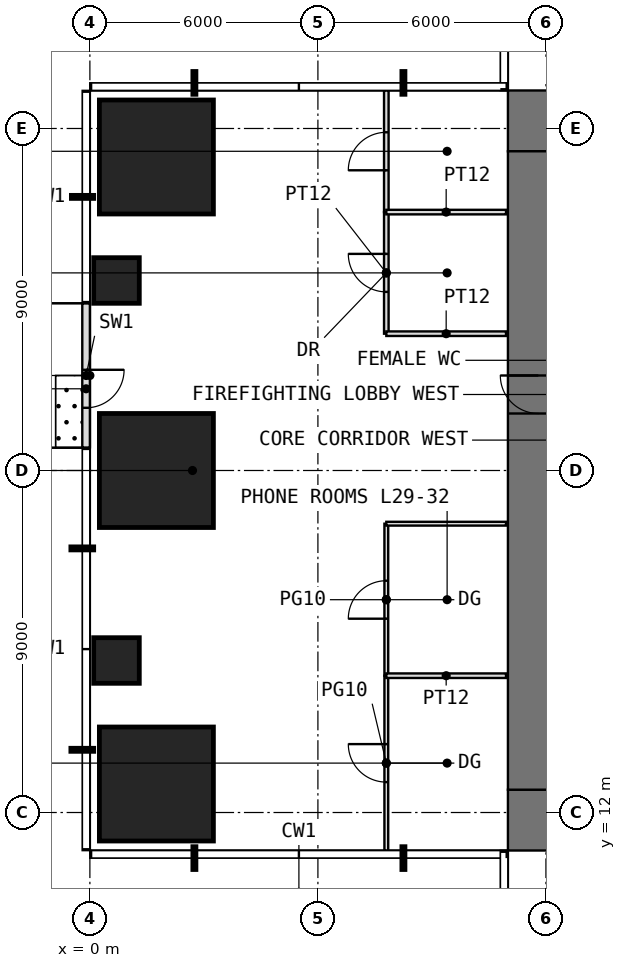
"""IFC4 building model, lengths in metres.
Left out: names, types, materials, properties, quantities, classifications, styles, units other than length and angle.
Written with IfcOpenShell. Run it as: python <this file> out.ifc"""

import sys

from ifc_helpers import new_model, si_unit, direction, frame, frame_2d, origin, origin_2d, place, context, subcontext, project, spatial, rectangle, extrude, element, fill, save


model = new_model("IFC4")
c1 = context("Model", 3, precision=1e-05, world=origin(), true_north=direction((0.0, 1.0)))
c2 = subcontext(c1, "Body", "Model", "MODEL_VIEW")
j1 = project(units=[si_unit("LENGTHUNIT", "METRE"), si_unit("PLANEANGLEUNIT", "RADIAN")], contexts=[c1])
p1 = place(None, origin())
s1 = spatial("IfcSite", under=j1, at=p1, CompositionType="ELEMENT")
p2 = place(p1, origin())
s2 = spatial("IfcBuilding", under=s1, at=p2, CompositionType="ELEMENT")
p3 = place(p2, frame((0.0, 0.0, 124.5)))
s3 = spatial("IfcBuildingStorey", under=s2, at=p3, CompositionType="ELEMENT", Elevation=124.5)
p4 = place(p3, frame((1.75, 12.75, 0.0), z_axis=(0.0, 0.0, 1.0), x_axis=(1.0, 0.0, 0.0)))
e1 = element("IfcColumn", 1, at=p4, inside=s3, PredefinedType="COLUMN", context=c2, shape_type="SweptSolid", body=[
    extrude(rectangle(XDim=3.0, YDim=3.0, at=origin_2d()), origin(), (0.0, 0.0, 1.0), 4.0),
])
p5 = place(p3, frame((0.7, 16.0, 0.0), z_axis=(0.0, 0.0, 1.0), x_axis=(1.0, 0.0, 0.0)))
e2 = element("IfcColumn", 2, at=p5, inside=s3, PredefinedType="COLUMN", context=c2, shape_type="SweptSolid", body=[
    extrude(rectangle(XDim=1.2, YDim=1.2, at=origin_2d()), origin(), (0.0, 0.0, 1.0), 4.0),
])
p6 = place(p3, frame((1.75, 21.0, 0.0), z_axis=(0.0, 0.0, 1.0), x_axis=(1.0, 0.0, 0.0)))
e3 = element("IfcColumn", 3, at=p6, inside=s3, PredefinedType="COLUMN", context=c2, shape_type="SweptSolid", body=[
    extrude(rectangle(XDim=3.0, YDim=3.0, at=origin_2d()), origin(), (0.0, 0.0, 1.0), 4.0),
])
p7 = place(p3, frame((0.7, 26.0, 0.0), z_axis=(0.0, 0.0, 1.0), x_axis=(1.0, 0.0, 0.0)))
e4 = element("IfcColumn", 4, at=p7, inside=s3, PredefinedType="COLUMN", context=c2, shape_type="SweptSolid", body=[
    extrude(rectangle(XDim=1.2, YDim=1.2, at=origin_2d()), origin(), (0.0, 0.0, 1.0), 4.0),
])
p8 = place(p3, frame((1.75, 29.25, 0.0), z_axis=(0.0, 0.0, 1.0), x_axis=(1.0, 0.0, 0.0)))
e5 = element("IfcColumn", 5, at=p8, inside=s3, PredefinedType="COLUMN", context=c2, shape_type="SweptSolid", body=[
    extrude(rectangle(XDim=3.0, YDim=3.0, at=origin_2d()), origin(), (0.0, 0.0, 1.0), 4.0),
])
p9 = place(p3, frame((-0.1, 25.4, 0.0), z_axis=(0.0, 0.0, 1.0), x_axis=(0.0, -1.0, 0.0)))
e6 = element("IfcWall", 6, at=p9, inside=s3, PredefinedType="USERDEFINED", context=c2, shape_type="SweptSolid", body=[
    extrude(rectangle(XDim=3.8, YDim=0.2, at=frame_2d((1.9, 0.0))), origin(), (0.0, 0.0, 1.0), 3.75),
])
p10 = place(p9, frame((1.75, 0.0, 0.0)))
e7 = element("IfcOpeningElement", 7, at=p10, cuts=e6, PredefinedType="OPENING", context=c2, shape_type="SweptSolid", body=[
    extrude(rectangle(XDim=1.0, YDim=2.4, at=frame_2d((0.5, 1.2))), frame((0.0, 0.11, 0.0), z_axis=(0.0, -1.0, 0.0), x_axis=(1.0, 0.0, 0.0)), (0.0, 0.0, 1.0), 0.22),
])
p11 = place(p3, frame((11.0, 11.8, -0.05), z_axis=(0.0, 0.0, 1.0), x_axis=(1.0, 0.0, 0.0)))
e8 = element("IfcWall", 8, at=p11, inside=s3, PredefinedType="SHEAR", context=c2, shape_type="SweptSolid", body=[
    extrude(rectangle(XDim=20.0, YDim=1.6, at=frame_2d((10.0, 0.0))), origin(), (0.0, 0.0, 1.0), 4.0),
])
p12 = place(p11, frame((9.0, 0.0, 0.05)))
e9 = element("IfcOpeningElement", 9, at=p12, cuts=e8, PredefinedType="OPENING", context=c2, shape_type="SweptSolid", body=[
    extrude(rectangle(XDim=2.0, YDim=2.2, at=frame_2d((1.0, 1.1))), frame((0.0, 0.81, 0.0), z_axis=(0.0, -1.0, 0.0), x_axis=(1.0, 0.0, 0.0)), (0.0, 0.0, 1.0), 1.62),
])
p13 = place(p3, frame((11.0, 30.2, -0.05), z_axis=(0.0, 0.0, 1.0), x_axis=(1.0, 0.0, 0.0)))
e10 = element("IfcWall", 10, at=p13, inside=s3, PredefinedType="SHEAR", context=c2, shape_type="SweptSolid", body=[
    extrude(rectangle(XDim=20.0, YDim=1.6, at=frame_2d((10.0, 0.0))), origin(), (0.0, 0.0, 1.0), 4.0),
])
p14 = place(p13, frame((9.0, 0.0, 0.05)))
e11 = element("IfcOpeningElement", 11, at=p14, cuts=e10, PredefinedType="OPENING", context=c2, shape_type="SweptSolid", body=[
    extrude(rectangle(XDim=2.0, YDim=2.2, at=frame_2d((1.0, 1.1))), frame((0.0, 0.81, 0.0), z_axis=(0.0, -1.0, 0.0), x_axis=(1.0, 0.0, 0.0)), (0.0, 0.0, 1.0), 1.62),
])
p15 = place(p3, frame((11.8, 12.6, -0.05), z_axis=(0.0, 0.0, 1.0), x_axis=(0.0, 1.0, 0.0)))
e12 = element("IfcWall", 12, at=p15, inside=s3, PredefinedType="SHEAR", context=c2, shape_type="SweptSolid", body=[
    extrude(rectangle(XDim=16.8, YDim=1.6, at=frame_2d((8.4, 0.0))), origin(), (0.0, 0.0, 1.0), 4.0),
])
p16 = place(p15, frame((9.9, 0.0, 0.05)))
e13 = element("IfcOpeningElement", 13, at=p16, cuts=e12, PredefinedType="OPENING", context=c2, shape_type="SweptSolid", body=[
    extrude(rectangle(XDim=1.0, YDim=2.2, at=frame_2d((0.5, 1.1))), frame((0.0, 0.81, 0.0), z_axis=(0.0, -1.0, 0.0), x_axis=(1.0, 0.0, 0.0)), (0.0, 0.0, 1.0), 1.62),
])
p17 = place(p3, frame((7.8, 11.0, 0.0), z_axis=(0.0, 0.0, 1.0), x_axis=(0.0, 1.0, 0.0)))
e14 = element("IfcWall", 14, at=p17, inside=s3, PredefinedType="PARTITIONING", context=c2, shape_type="SweptSolid", body=[
    extrude(rectangle(XDim=4.6, YDim=0.1, at=frame_2d((2.3, 0.0))), origin(), (0.0, 0.0, 1.0), 3.75),
])
p18 = place(p17, frame((1.8, 0.0, 0.0)))
e15 = element("IfcOpeningElement", 15, at=p18, cuts=e14, PredefinedType="OPENING", context=c2, shape_type="SweptSolid", body=[
    extrude(rectangle(XDim=1.0, YDim=2.4, at=frame_2d((0.5, 1.2))), frame((0.0, 0.06, 0.0), z_axis=(0.0, -1.0, 0.0), x_axis=(1.0, 0.0, 0.0)), (0.0, 0.0, 1.0), 0.12),
])
p19 = place(p3, frame((7.8, 15.6, 0.0), z_axis=(0.0, 0.0, 1.0), x_axis=(0.0, 1.0, 0.0)))
e16 = element("IfcWall", 16, at=p19, inside=s3, PredefinedType="PARTITIONING", context=c2, shape_type="SweptSolid", body=[
    extrude(rectangle(XDim=4.0, YDim=0.1, at=frame_2d((2.0, 0.0))), origin(), (0.0, 0.0, 1.0), 3.75),
])
p20 = place(p19, frame((1.5, 0.0, 0.0)))
e17 = element("IfcOpeningElement", 17, at=p20, cuts=e16, PredefinedType="OPENING", context=c2, shape_type="SweptSolid", body=[
    extrude(rectangle(XDim=1.0, YDim=2.4, at=frame_2d((0.5, 1.2))), frame((0.0, 0.06, 0.0), z_axis=(0.0, -1.0, 0.0), x_axis=(1.0, 0.0, 0.0)), (0.0, 0.0, 1.0), 0.12),
])
p21 = place(p3, frame((7.8, 15.6, 0.0), z_axis=(0.0, 0.0, 1.0), x_axis=(1.0, 0.0, 0.0)))
e18 = element("IfcWall", 18, at=p21, inside=s3, PredefinedType="PARTITIONING", context=c2, shape_type="SweptSolid", body=[
    extrude(rectangle(XDim=3.15, YDim=0.12, at=frame_2d((1.575, 0.0))), origin(), (0.0, 0.0, 1.0), 3.75),
])
p22 = place(p3, frame((7.8, 19.6, 0.0), z_axis=(0.0, 0.0, 1.0), x_axis=(1.0, 0.0, 0.0)))
e19 = element("IfcWall", 19, at=p22, inside=s3, PredefinedType="PARTITIONING", context=c2, shape_type="SweptSolid", body=[
    extrude(rectangle(XDim=3.15, YDim=0.1, at=frame_2d((1.575, 0.0))), origin(), (0.0, 0.0, 1.0), 3.75),
])
p23 = place(p3, frame((7.8, 24.6, 0.0), z_axis=(0.0, 0.0, 1.0), x_axis=(0.0, 1.0, 0.0)))
e20 = element("IfcWall", 20, at=p23, inside=s3, PredefinedType="PARTITIONING", context=c2, shape_type="SweptSolid", body=[
    extrude(rectangle(XDim=3.2, YDim=0.12, at=frame_2d((1.6, 0.0))), origin(), (0.0, 0.0, 1.0), 3.75),
])
p24 = place(p23, frame((1.1, 0.0, 0.0)))
e21 = element("IfcOpeningElement", 21, at=p24, cuts=e20, PredefinedType="OPENING", context=c2, shape_type="SweptSolid", body=[
    extrude(rectangle(XDim=1.0, YDim=2.2, at=frame_2d((0.5, 1.1))), frame((0.0, 0.07, 0.0), z_axis=(0.0, -1.0, 0.0), x_axis=(1.0, 0.0, 0.0)), (0.0, 0.0, 1.0), 0.14),
])
p25 = place(p3, frame((7.8, 24.6, 0.0), z_axis=(0.0, 0.0, 1.0), x_axis=(1.0, 0.0, 0.0)))
e22 = element("IfcWall", 22, at=p25, inside=s3, PredefinedType="PARTITIONING", context=c2, shape_type="SweptSolid", body=[
    extrude(rectangle(XDim=3.15, YDim=0.12, at=frame_2d((1.575, 0.0))), origin(), (0.0, 0.0, 1.0), 3.75),
])
p26 = place(p3, frame((7.8, 27.8, 0.0), z_axis=(0.0, 0.0, 1.0), x_axis=(0.0, 1.0, 0.0)))
e23 = element("IfcWall", 23, at=p26, inside=s3, PredefinedType="PARTITIONING", context=c2, shape_type="SweptSolid", body=[
    extrude(rectangle(XDim=3.2, YDim=0.12, at=frame_2d((1.6, 0.0))), origin(), (0.0, 0.0, 1.0), 3.75),
])
p27 = place(p26, frame((1.1, 0.0, 0.0)))
e24 = element("IfcOpeningElement", 24, at=p27, cuts=e23, PredefinedType="OPENING", context=c2, shape_type="SweptSolid", body=[
    extrude(rectangle(XDim=1.0, YDim=2.2, at=frame_2d((0.5, 1.1))), frame((0.0, 0.07, 0.0), z_axis=(0.0, -1.0, 0.0), x_axis=(1.0, 0.0, 0.0)), (0.0, 0.0, 1.0), 0.14),
])
p28 = place(p3, frame((7.8, 27.8, 0.0), z_axis=(0.0, 0.0, 1.0), x_axis=(1.0, 0.0, 0.0)))
e25 = element("IfcWall", 25, at=p28, inside=s3, PredefinedType="PARTITIONING", context=c2, shape_type="SweptSolid", body=[
    extrude(rectangle(XDim=3.15, YDim=0.12, at=frame_2d((1.575, 0.0))), origin(), (0.0, 0.0, 1.0), 3.75),
])
p29 = place(p10, origin())
e26 = element("IfcDoor", 26, at=p29, inside=s3, OperationType="SINGLE_SWING_LEFT", PredefinedType="DOOR", context=c2, shape_type="SweptSolid", body=[
    extrude(rectangle(XDim=1.0, YDim=2.4, at=frame_2d((0.5, 1.2))), frame((0.0, 0.025, 0.0), z_axis=(0.0, -1.0, 0.0), x_axis=(1.0, 0.0, 0.0)), (0.0, 0.0, 1.0), 0.05),
])
fill(e7, e26)
p30 = place(p16, origin())
e27 = element("IfcDoor", 27, at=p30, inside=s3, OperationType="SINGLE_SWING_RIGHT", PredefinedType="DOOR", context=c2, shape_type="SweptSolid", body=[
    extrude(rectangle(XDim=1.0, YDim=2.2, at=frame_2d((0.5, 1.1))), frame((0.0, 0.025, 0.0), z_axis=(0.0, -1.0, 0.0), x_axis=(1.0, 0.0, 0.0)), (0.0, 0.0, 1.0), 0.05),
])
fill(e13, e27)
p31 = place(p18, origin())
e28 = element("IfcDoor", 28, at=p31, inside=s3, OperationType="SINGLE_SWING_RIGHT", PredefinedType="DOOR", context=c2, shape_type="SweptSolid", body=[
    extrude(rectangle(XDim=1.0, YDim=2.4, at=frame_2d((0.5, 1.2))), frame((0.0, 0.025, 0.0), z_axis=(0.0, -1.0, 0.0), x_axis=(1.0, 0.0, 0.0)), (0.0, 0.0, 1.0), 0.05),
])
fill(e15, e28)
p32 = place(p20, origin())
e29 = element("IfcDoor", 29, at=p32, inside=s3, OperationType="SINGLE_SWING_LEFT", PredefinedType="DOOR", context=c2, shape_type="SweptSolid", body=[
    extrude(rectangle(XDim=1.0, YDim=2.4, at=frame_2d((0.5, 1.2))), frame((0.0, 0.025, 0.0), z_axis=(0.0, -1.0, 0.0), x_axis=(1.0, 0.0, 0.0)), (0.0, 0.0, 1.0), 0.05),
])
fill(e17, e29)
p33 = place(p24, origin())
e30 = element("IfcDoor", 30, at=p33, inside=s3, OperationType="SINGLE_SWING_RIGHT", PredefinedType="DOOR", context=c2, shape_type="SweptSolid", body=[
    extrude(rectangle(XDim=1.0, YDim=2.2, at=frame_2d((0.5, 1.1))), frame((0.0, 0.025, 0.0), z_axis=(0.0, -1.0, 0.0), x_axis=(1.0, 0.0, 0.0)), (0.0, 0.0, 1.0), 0.05),
])
fill(e21, e30)
p34 = place(p27, origin())
e31 = element("IfcDoor", 31, at=p34, inside=s3, OperationType="SINGLE_SWING_LEFT", PredefinedType="DOOR", context=c2, shape_type="SweptSolid", body=[
    extrude(rectangle(XDim=1.0, YDim=2.2, at=frame_2d((0.5, 1.1))), frame((0.0, 0.025, 0.0), z_axis=(0.0, -1.0, 0.0), x_axis=(1.0, 0.0, 0.0)), (0.0, 0.0, 1.0), 0.05),
])
fill(e24, e31)
save(model, sys.argv[1])
